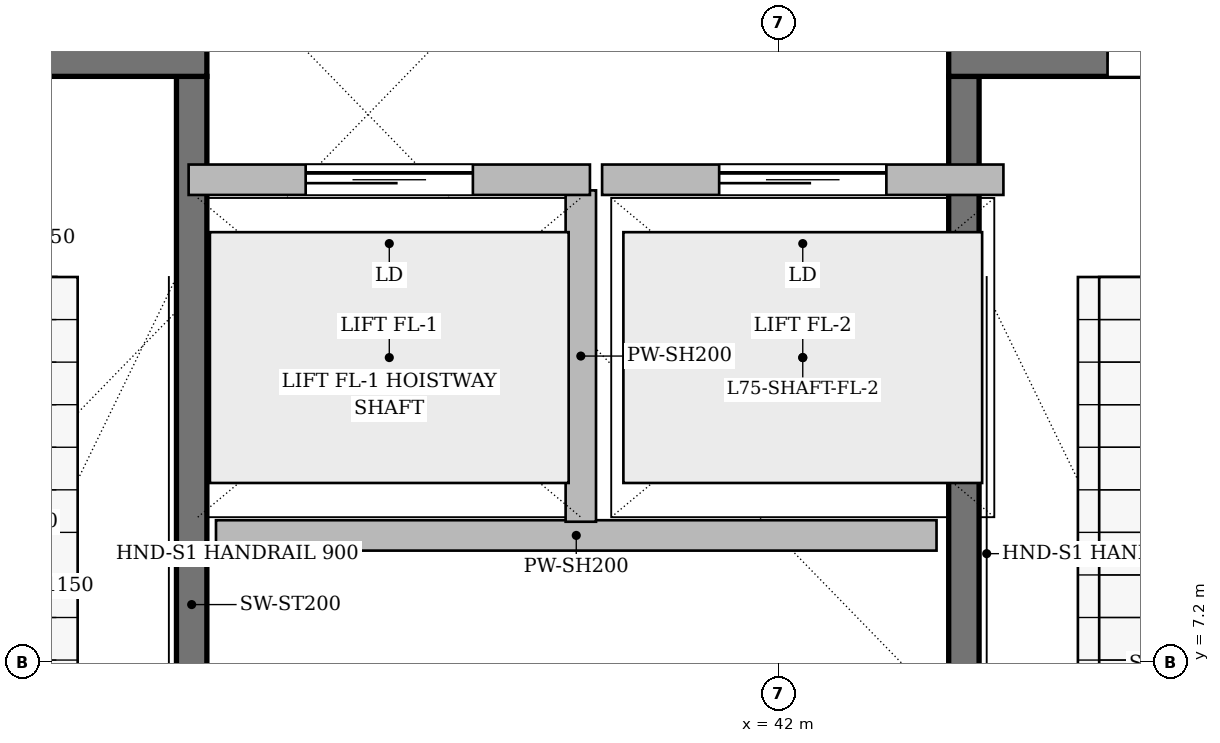
"""IFC4 building model, lengths in metres.
Left out: names, types, materials, properties, quantities, classifications, styles, units other than length and angle.
Written with IfcOpenShell. Run it as: python <this file> out.ifc"""

import sys

from ifc_helpers import new_model, si_unit, direction, frame, frame_2d, origin, place, context, subcontext, project, spatial, rectangle, extrude, source, transform, mapped, element, fill, save


model = new_model("IFC4")
c1 = context("Model", 3, precision=1e-05, world=origin(), true_north=direction((0.0, 1.0)))
c2 = subcontext(c1, "Body", "Model", "MODEL_VIEW")
j1 = project(units=[si_unit("LENGTHUNIT", "METRE"), si_unit("PLANEANGLEUNIT", "RADIAN")], contexts=[c1])
p1 = place(None, origin())
s1 = spatial("IfcSite", under=j1, at=p1, CompositionType="ELEMENT")
p2 = place(p1, origin())
s2 = spatial("IfcBuilding", under=s1, at=p2, CompositionType="ELEMENT")
p3 = place(p2, frame((0.0, 0.0, 299.1)))
s3 = spatial("IfcBuildingStorey", under=s2, at=p3, CompositionType="ELEMENT", Elevation=299.1)
p4 = place(p3, frame((38.14, 4.1, 0.0), z_axis=(0.0, 0.0, 1.0), x_axis=(0.0, 1.0, 0.0)))
e1 = element("IfcWall", 1, at=p4, inside=s3, PredefinedType="SHEAR", context=c2, shape_type="SweptSolid", body=[
    extrude(rectangle(XDim=6.95, YDim=0.2, at=frame_2d((3.475, 0.0))), origin(), (0.0, 0.0, 1.0), 4.8),
])
p5 = place(p3, frame((35.025, 11.15, 0.0), z_axis=(0.0, 0.0, 1.0), x_axis=(1.0, 0.0, 0.0)))
e2 = element("IfcWall", 2, at=p5, inside=s3, PredefinedType="SHEAR", context=c2, shape_type="SweptSolid", body=[
    extrude(rectangle(XDim=3.215, YDim=0.2, at=frame_2d((1.607, 0.0))), origin(), (0.0, 0.0, 1.0), 4.8),
])
p6 = place(p5, frame((1.12, 0.0, 0.0)))
e3 = element("IfcOpeningElement", 3, at=p6, cuts=e2, PredefinedType="OPENING", context=c2, shape_type="SweptSolid", body=[
    extrude(rectangle(XDim=1.05, YDim=2.2, at=frame_2d((0.525, 1.1))), frame((0.0, 0.11, 0.0), z_axis=(0.0, -1.0, 0.0), x_axis=(1.0, 0.0, 0.0)), (0.0, 0.0, 1.0), 0.22),
])
p7 = place(p3, frame((43.22, 4.1, 0.0), z_axis=(0.0, 0.0, 1.0), x_axis=(0.0, 1.0, 0.0)))
e4 = element("IfcWall", 4, at=p7, inside=s3, PredefinedType="SHEAR", context=c2, shape_type="SweptSolid", body=[
    extrude(rectangle(XDim=6.95, YDim=0.2, at=frame_2d((3.475, 0.0))), origin(), (0.0, 0.0, 1.0), 4.8),
])
p8 = place(p3, frame((43.12, 11.15, 0.0), z_axis=(0.0, 0.0, 1.0), x_axis=(1.0, 0.0, 0.0)))
e5 = element("IfcWall", 5, at=p8, inside=s3, PredefinedType="SHEAR", context=c2, shape_type="SweptSolid", body=[
    extrude(rectangle(XDim=6.455, YDim=0.2, at=frame_2d((3.228, 0.0))), origin(), (0.0, 0.0, 1.0), 4.8),
])
p9 = place(p8, frame((1.045, 0.0, 0.0)))
e6 = element("IfcOpeningElement", 6, at=p9, cuts=e5, PredefinedType="OPENING", context=c2, shape_type="SweptSolid", body=[
    extrude(rectangle(XDim=1.05, YDim=2.2, at=frame_2d((0.525, 1.1))), frame((0.0, 0.11, 0.0), z_axis=(0.0, -1.0, 0.0), x_axis=(1.0, 0.0, 0.0)), (0.0, 0.0, 1.0), 0.22),
])
p10 = place(p8, frame((4.125, 0.0, 0.0)))
e7 = element("IfcOpeningElement", 7, at=p10, cuts=e5, PredefinedType="OPENING", context=c2, shape_type="SweptSolid", body=[
    extrude(rectangle(XDim=1.05, YDim=2.2, at=frame_2d((0.525, 1.1))), frame((0.0, 0.11, 0.0), z_axis=(0.0, -1.0, 0.0), x_axis=(1.0, 0.0, 0.0)), (0.0, 0.0, 1.0), 0.22),
])
p11 = place(p3, frame((38.3, 8.03, 0.0), z_axis=(0.0, 0.0, 1.0), x_axis=(1.0, 0.0, 0.0)))
e8 = element("IfcWall", 8, at=p11, inside=s3, PredefinedType="PARTITIONING", context=c2, shape_type="SweptSolid", body=[
    extrude(rectangle(XDim=4.74, YDim=0.2, at=frame_2d((2.37, 0.0))), origin(), (0.0, 0.0, 1.0), 4.5),
])
p12 = place(p3, frame((40.7, 8.12, 0.0), z_axis=(0.0, 0.0, 1.0), x_axis=(0.0, 1.0, 0.0)))
e9 = element("IfcWall", 9, at=p12, inside=s3, PredefinedType="PARTITIONING", context=c2, shape_type="SweptSolid", body=[
    extrude(rectangle(XDim=2.18, YDim=0.2, at=frame_2d((1.09, 0.0))), origin(), (0.0, 0.0, 1.0), 4.5),
])
p13 = place(p3, frame((38.12, 10.37, 0.0), z_axis=(0.0, 0.0, 1.0), x_axis=(1.0, 0.0, 0.0)))
e10 = element("IfcWall", 10, at=p13, inside=s3, PredefinedType="PARTITIONING", context=c2, shape_type="SweptSolid", body=[
    extrude(rectangle(XDim=2.64, YDim=0.2, at=frame_2d((1.32, 0.0))), origin(), (0.0, 0.0, 1.0), 4.5),
])
p14 = place(p13, frame((0.77, 0.0, 0.0)))
e11 = element("IfcOpeningElement", 11, at=p14, cuts=e10, PredefinedType="OPENING", context=c2, shape_type="SweptSolid", body=[
    extrude(rectangle(XDim=1.1, YDim=2.2, at=frame_2d((0.55, 1.1))), frame((0.0, 0.11, 0.0), z_axis=(0.0, -1.0, 0.0), x_axis=(1.0, 0.0, 0.0)), (0.0, 0.0, 1.0), 0.22),
])
p15 = place(p3, frame((40.84, 10.37, 0.0), z_axis=(0.0, 0.0, 1.0), x_axis=(1.0, 0.0, 0.0)))
e12 = element("IfcWall", 12, at=p15, inside=s3, PredefinedType="PARTITIONING", context=c2, shape_type="SweptSolid", body=[
    extrude(rectangle(XDim=2.64, YDim=0.2, at=frame_2d((1.32, 0.0))), origin(), (0.0, 0.0, 1.0), 4.5),
])
p16 = place(p15, frame((0.77, 0.0, 0.0)))
e13 = element("IfcOpeningElement", 13, at=p16, cuts=e12, PredefinedType="OPENING", context=c2, shape_type="SweptSolid", body=[
    extrude(rectangle(XDim=1.1, YDim=2.2, at=frame_2d((0.55, 1.1))), frame((0.0, 0.11, 0.0), z_axis=(0.0, -1.0, 0.0), x_axis=(1.0, 0.0, 0.0)), (0.0, 0.0, 1.0), 0.22),
])
m1 = source(origin(), c2, "Body", "SweptSolid", [
    extrude(rectangle(XDim=1.05, YDim=2.2, at=frame_2d((0.525, 1.1))), frame((0.0, 0.025, 0.0), z_axis=(0.0, -1.0, 0.0), x_axis=(1.0, 0.0, 0.0)), (0.0, 0.0, 1.0), 0.05),
])
p17 = place(p9, origin())
e14 = element("IfcDoor", 14, at=p17, inside=s3, OperationType="SINGLE_SWING_RIGHT", PredefinedType="DOOR", context=c2, shape_type="MappedRepresentation", body=[
    mapped(m1, transform((0.0, 0.0, 0.0), scale=1.0)),
])
fill(e6, e14)
m2 = source(origin(), c2, "Body", "SweptSolid", [
    extrude(rectangle(XDim=1.1, YDim=2.2, at=frame_2d((0.55, 1.1))), frame((0.0, 0.025, 0.0), z_axis=(0.0, -1.0, 0.0), x_axis=(1.0, 0.0, 0.0)), (0.0, 0.0, 1.0), 0.05),
])
p18 = place(p14, origin())
e15 = element("IfcDoor", 15, at=p18, inside=s3, OperationType="SLIDING_TO_LEFT", PredefinedType="DOOR", context=c2, shape_type="MappedRepresentation", body=[
    mapped(m2, transform((0.0, 0.0, 0.0), scale=1.0)),
])
fill(e11, e15)
p19 = place(p16, origin())
e16 = element("IfcDoor", 16, at=p19, inside=s3, OperationType="SLIDING_TO_LEFT", PredefinedType="DOOR", context=c2, shape_type="MappedRepresentation", body=[
    mapped(m2, transform((0.0, 0.0, 0.0), scale=1.0)),
])
fill(e13, e16)
save(model, sys.argv[1])
